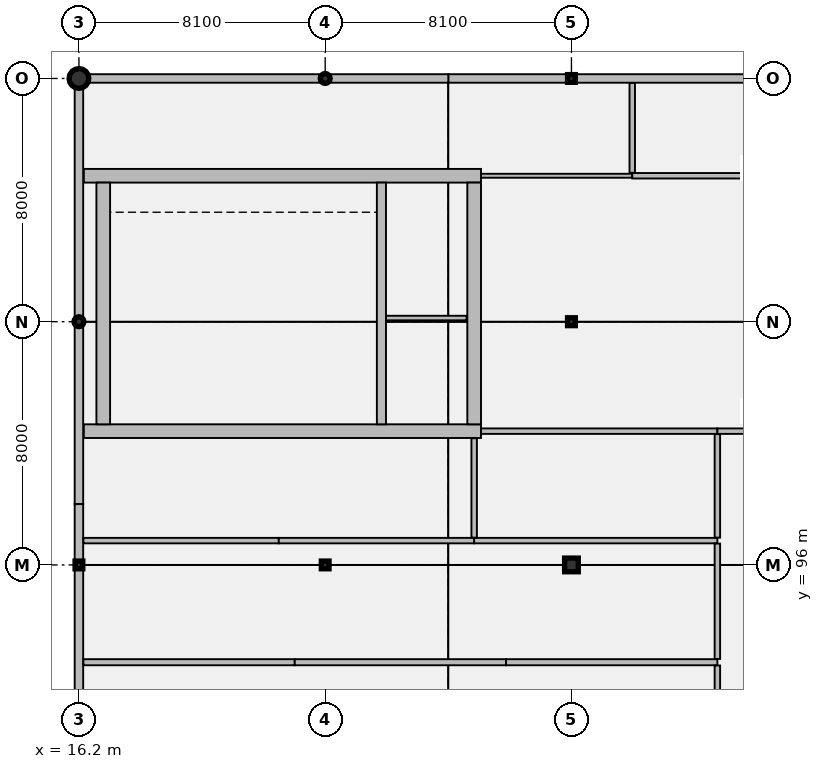
"""IFC4 building model, lengths in metres.
Left out: names, types, materials, properties, quantities, classifications, styles, units other than length and angle.
Written with IfcOpenShell. Run it as: python <this file> out.ifc"""

import sys

from ifc_helpers import new_model, si_unit, direction, frame, frame_2d, origin, origin_2d, place, context, subcontext, project, spatial, rectangle, hollow_rectangle, circle, hollow_circle, i_section, extrude, element, fill, save


model = new_model("IFC4")
c1 = context("Model", 3, precision=1e-05, world=origin(), true_north=direction((0.0, 1.0)))
c2 = subcontext(c1, "Body", "Model", "MODEL_VIEW")
j1 = project(units=[si_unit("LENGTHUNIT", "METRE"), si_unit("PLANEANGLEUNIT", "RADIAN")], contexts=[c1])
p1 = place(None, origin())
s1 = spatial("IfcSite", under=j1, at=p1, CompositionType="ELEMENT")
p2 = place(p1, origin())
s2 = spatial("IfcBuilding", under=s1, at=p2, CompositionType="ELEMENT")
p3 = place(p2, frame((0.0, 0.0, 33.3)))
s3 = spatial("IfcBuildingStorey", under=s2, at=p3, CompositionType="ELEMENT", Elevation=33.3)
p4 = place(p3, frame((16.36, 100.4, 0.0), z_axis=(0.0, 0.0, 1.0), x_axis=(1.0, 0.0, 0.0)))
e1 = element("IfcWall", 1, at=p4, inside=s3, PredefinedType="SHEAR", context=c2, shape_type="SweptSolid", body=[
    extrude(rectangle(XDim=13.065, YDim=0.45, at=frame_2d((6.532, 0.0))), origin(), (0.0, 0.0, 1.0), 3.98),
])
p5 = place(p4, frame((1.39, 0.0, 0.0)))
e2 = element("IfcOpeningElement", 2, at=p5, cuts=e1, PredefinedType="OPENING", context=c2, shape_type="SweptSolid", body=[
    extrude(rectangle(XDim=1.15, YDim=2.25, at=frame_2d((0.575, 1.125))), frame((0.0, 0.235, 0.0), z_axis=(0.0, -1.0, 0.0), x_axis=(1.0, 0.0, 0.0)), (0.0, 0.0, 1.0), 0.47),
])
p6 = place(p4, frame((10.695, 0.0, 0.0)))
e3 = element("IfcOpeningElement", 3, at=p6, cuts=e1, PredefinedType="OPENING", context=c2, shape_type="SweptSolid", body=[
    extrude(rectangle(XDim=1.1, YDim=2.2, at=frame_2d((0.55, 1.1))), frame((0.0, 0.235, 0.0), z_axis=(0.0, -1.0, 0.0), x_axis=(1.0, 0.0, 0.0)), (0.0, 0.0, 1.0), 0.47),
])
p7 = place(p3, frame((16.36, 108.8, 0.0), z_axis=(0.0, 0.0, 1.0), x_axis=(1.0, 0.0, 0.0)))
e4 = element("IfcWall", 4, at=p7, inside=s3, PredefinedType="SHEAR", context=c2, shape_type="SweptSolid", body=[
    extrude(rectangle(XDim=13.065, YDim=0.45, at=frame_2d((6.532, 0.0))), origin(), (0.0, 0.0, 1.0), 3.98),
])
for number, where, z_axis, x_axis in (
    (5, (17.0, 100.625, 0.0), (0.0, 0.0, 1.0), (0.0, 1.0, 0.0)),
    (6, (29.2, 100.625, 0.0), (0.0, 0.0, 1.0), (0.0, 1.0, 0.0)),
):
    element("IfcWall", number, at=place(p3, frame(where, z_axis=z_axis, x_axis=x_axis)), inside=s3, PredefinedType="SHEAR", context=c2, shape_type="SweptSolid", body=[
        extrude(rectangle(XDim=7.95, YDim=0.45, at=frame_2d((3.975, 0.0))), origin(), (0.0, 0.0, 1.0), 3.98),
    ])
p8 = place(p3, frame((26.15, 100.625, 0.0), z_axis=(0.0, 0.0, 1.0), x_axis=(0.0, 1.0, 0.0)))
e7 = element("IfcWall", 7, at=p8, inside=s3, PredefinedType="SHEAR", context=c2, shape_type="SweptSolid", body=[
    extrude(rectangle(XDim=7.95, YDim=0.3, at=frame_2d((3.975, 0.0))), origin(), (0.0, 0.0, 1.0), 3.98),
])
p9 = place(p3, frame((16.2, 96.0, 0.0), z_axis=(0.0, 0.0, 1.0), x_axis=(1.0, 0.0, 0.0)))
e8 = element("IfcColumn", 8, at=p9, inside=s3, PredefinedType="COLUMN", context=c2, shape_type="SweptSolid", body=[
    extrude(hollow_rectangle(XDim=0.254, YDim=0.254, WallThickness=0.013, InnerFilletRadius=0.013, OuterFilletRadius=0.025, at=origin_2d()), origin(), (0.0, 0.0, 1.0), 3.98),
])
p10 = place(p3, frame((16.2, 104.0, 0.0), z_axis=(0.0, 0.0, 1.0), x_axis=(1.0, 0.0, 0.0)))
e9 = element("IfcColumn", 9, at=p10, inside=s3, PredefinedType="COLUMN", context=c2, shape_type="SweptSolid", body=[
    extrude(hollow_circle(Radius=0.162, WallThickness=0.013, at=origin_2d()), origin(), (0.0, 0.0, 1.0), 3.98),
])
p11 = place(p3, frame((16.2, 112.0, 0.0), z_axis=(0.0, 0.0, 1.0), x_axis=(1.0, 0.0, 0.0)))
e10 = element("IfcColumn", 10, at=p11, inside=s3, PredefinedType="COLUMN", context=c2, shape_type="SweptSolid", body=[
    extrude(circle(Radius=0.325, at=origin_2d()), origin(), (0.0, 0.0, 1.0), 3.98),
])
p12 = place(p3, frame((24.3, 96.0, 0.0), z_axis=(0.0, 0.0, 1.0), x_axis=(1.0, 0.0, 0.0)))
e11 = element("IfcColumn", 11, at=p12, inside=s3, PredefinedType="COLUMN", context=c2, shape_type="SweptSolid", body=[
    extrude(hollow_rectangle(XDim=0.254, YDim=0.254, WallThickness=0.013, InnerFilletRadius=0.013, OuterFilletRadius=0.025, at=origin_2d()), origin(), (0.0, 0.0, 1.0), 3.98),
])
p13 = place(p3, frame((24.3, 112.0, 0.0), z_axis=(0.0, 0.0, 1.0), x_axis=(1.0, 0.0, 0.0)))
e12 = element("IfcColumn", 12, at=p13, inside=s3, PredefinedType="COLUMN", context=c2, shape_type="SweptSolid", body=[
    extrude(hollow_circle(Radius=0.162, WallThickness=0.013, at=origin_2d()), origin(), (0.0, 0.0, 1.0), 3.98),
])
p14 = place(p3, frame((32.4, 96.0, 0.0), z_axis=(0.0, 0.0, 1.0), x_axis=(1.0, 0.0, 0.0)))
e13 = element("IfcColumn", 13, at=p14, inside=s3, PredefinedType="COLUMN", context=c2, shape_type="SweptSolid", body=[
    extrude(rectangle(XDim=0.45, YDim=0.45, at=origin_2d()), origin(), (0.0, 0.0, 1.0), 3.98),
])
p15 = place(p3, frame((32.4, 104.0, 0.0), z_axis=(0.0, 0.0, 1.0), x_axis=(1.0, 0.0, 0.0)))
e14 = element("IfcColumn", 14, at=p15, inside=s3, PredefinedType="COLUMN", context=c2, shape_type="SweptSolid", body=[
    extrude(i_section(OverallWidth=0.256, OverallDepth=0.26, WebThickness=0.011, FlangeThickness=0.017, FilletRadius=0.013, at=origin_2d()), origin(), (0.0, 0.0, 1.0), 3.98),
])
p16 = place(p3, frame((32.4, 112.0, 0.0), z_axis=(0.0, 0.0, 1.0), x_axis=(1.0, 0.0, 0.0)))
e15 = element("IfcColumn", 15, at=p16, inside=s3, PredefinedType="COLUMN", context=c2, shape_type="SweptSolid", body=[
    extrude(hollow_rectangle(XDim=0.254, YDim=0.254, WallThickness=0.013, InnerFilletRadius=0.013, OuterFilletRadius=0.025, at=origin_2d()), origin(), (0.0, 0.0, 1.0), 3.98),
])
p17 = place(p3, frame((40.5, 112.0, 0.0), z_axis=(0.0, 0.0, 1.0), x_axis=(-1.0, 0.0, 0.0)))
e16 = element("IfcWall", 16, at=p17, inside=s3, PredefinedType="SOLIDWALL", context=c2, shape_type="SweptSolid", body=[
    extrude(rectangle(XDim=12.15, YDim=0.28, at=frame_2d((6.075, 0.0))), origin(), (0.0, 0.0, 1.0), 3.655),
])
p18 = place(p17, frame((3.6, 0.0, 0.85)))
e17 = element("IfcOpeningElement", 17, at=p18, cuts=e16, PredefinedType="OPENING", context=c2, shape_type="SweptSolid", body=[
    extrude(rectangle(XDim=1.35, YDim=2.1, at=frame_2d((0.675, 1.05))), frame((0.0, 0.15, 0.0), z_axis=(0.0, -1.0, 0.0), x_axis=(1.0, 0.0, 0.0)), (0.0, 0.0, 1.0), 0.3),
])
p19 = place(p3, frame((28.35, 112.0, 0.0), z_axis=(0.0, 0.0, 1.0), x_axis=(-1.0, 0.0, 0.0)))
e18 = element("IfcWall", 18, at=p19, inside=s3, PredefinedType="SOLIDWALL", context=c2, shape_type="SweptSolid", body=[
    extrude(rectangle(XDim=12.15, YDim=0.28, at=frame_2d((6.075, 0.0))), origin(), (0.0, 0.0, 1.0), 3.655),
])
p20 = place(p19, frame((5.4, 0.0, 0.95)))
e19 = element("IfcOpeningElement", 19, at=p20, cuts=e18, PredefinedType="OPENING", context=c2, shape_type="SweptSolid", body=[
    extrude(rectangle(XDim=1.5, YDim=1.8, at=frame_2d((0.75, 0.9))), frame((0.0, 0.15, 0.0), z_axis=(0.0, -1.0, 0.0), x_axis=(1.0, 0.0, 0.0)), (0.0, 0.0, 1.0), 0.3),
])
p21 = place(p3, frame((16.2, 112.0, 0.0), z_axis=(0.0, 0.0, 1.0), x_axis=(0.0, -1.0, 0.0)))
e20 = element("IfcWall", 20, at=p21, inside=s3, PredefinedType="SOLIDWALL", context=c2, shape_type="SweptSolid", body=[
    extrude(rectangle(XDim=14.0, YDim=0.28, at=frame_2d((7.0, 0.0))), origin(), (0.0, 0.0, 1.0), 3.655),
])
p22 = place(p3, frame((16.2, 98.0, 0.0), z_axis=(0.0, 0.0, 1.0), x_axis=(0.0, -1.0, 0.0)))
e21 = element("IfcWall", 21, at=p22, inside=s3, PredefinedType="SOLIDWALL", context=c2, shape_type="SweptSolid", body=[
    extrude(rectangle(XDim=14.0, YDim=0.28, at=frame_2d((7.0, 0.0))), origin(), (0.0, 0.0, 1.0), 3.655),
])
p23 = place(p22, frame((6.3, 0.0, 0.95)))
e22 = element("IfcOpeningElement", 22, at=p23, cuts=e21, PredefinedType="OPENING", context=c2, shape_type="SweptSolid", body=[
    extrude(rectangle(XDim=1.8, YDim=1.5, at=frame_2d((0.9, 0.75))), frame((0.0, 0.15, 0.0), z_axis=(0.0, -1.0, 0.0), x_axis=(1.0, 0.0, 0.0)), (0.0, 0.0, 1.0), 0.3),
])
p24 = place(p3, frame((26.3, 104.12, 0.0), z_axis=(0.0, 0.0, 1.0), x_axis=(1.0, 0.0, 0.0)))
e23 = element("IfcWall", 23, at=p24, inside=s3, PredefinedType="PARTITIONING", context=c2, shape_type="SweptSolid", body=[
    extrude(rectangle(XDim=2.65, YDim=0.15, at=frame_2d((1.325, 0.0))), origin(), (0.0, 0.0, 1.0), 3.98),
])
for number, where, z_axis, x_axis in (
    (24, (16.348, 92.8, 0.0), (0.0, 0.0, 1.0), (1.0, 0.0, 0.0)),
    (25, (23.299, 92.8, 0.0), (0.0, 0.0, 1.0), (1.0, 0.0, 0.0)),
    (26, (30.249, 92.8, 0.0), (0.0, 0.0, 1.0), (1.0, 0.0, 0.0)),
):
    element("IfcWall", number, at=place(p3, frame(where, z_axis=z_axis, x_axis=x_axis)), inside=s3, PredefinedType="PARTITIONING", context=c2, shape_type="SweptSolid", body=[
        extrude(rectangle(XDim=6.951, YDim=0.2, at=frame_2d((3.475, 0.0))), origin(), (0.0, 0.0, 1.0), 3.98),
    ])
for number, where, z_axis, x_axis in (
    (27, (16.348, 96.8, 0.0), (0.0, 0.0, 1.0), (1.0, 0.0, 0.0)),
    (28, (22.774, 96.8, 0.0), (0.0, 0.0, 1.0), (1.0, 0.0, 0.0)),
):
    element("IfcWall", number, at=place(p3, frame(where, z_axis=z_axis, x_axis=x_axis)), inside=s3, PredefinedType="PARTITIONING", context=c2, shape_type="SweptSolid", body=[
        extrude(rectangle(XDim=6.426, YDim=0.18, at=frame_2d((3.213, 0.0))), origin(), (0.0, 0.0, 1.0), 3.98),
    ])
p25 = place(p3, frame((29.2, 96.8, 0.0), z_axis=(0.0, 0.0, 1.0), x_axis=(1.0, 0.0, 0.0)))
e29 = element("IfcWall", 29, at=p25, inside=s3, PredefinedType="PARTITIONING", context=c2, shape_type="SweptSolid", body=[
    extrude(rectangle(XDim=8.0, YDim=0.18, at=frame_2d((4.0, 0.0))), origin(), (0.0, 0.0, 1.0), 3.98),
])
p26 = place(p3, frame((29.425, 100.4, 0.0), z_axis=(0.0, 0.0, 1.0), x_axis=(1.0, 0.0, 0.0)))
e30 = element("IfcWall", 30, at=p26, inside=s3, PredefinedType="PARTITIONING", context=c2, shape_type="SweptSolid", body=[
    extrude(rectangle(XDim=7.775, YDim=0.18, at=frame_2d((3.887, 0.0))), origin(), (0.0, 0.0, 1.0), 3.98),
])
p27 = place(p26, frame((3.387, 0.0, 0.0)))
e31 = element("IfcOpeningElement", 31, at=p27, cuts=e30, PredefinedType="OPENING", context=c2, shape_type="SweptSolid", body=[
    extrude(rectangle(XDim=1.0, YDim=2.2, at=frame_2d((0.5, 1.1))), frame((0.0, 0.1, 0.0), z_axis=(0.0, -1.0, 0.0), x_axis=(1.0, 0.0, 0.0)), (0.0, 0.0, 1.0), 0.2),
])
p28 = place(p3, frame((29.425, 108.8, 0.0), z_axis=(0.0, 0.0, 1.0), x_axis=(1.0, 0.0, 0.0)))
e32 = element("IfcWall", 32, at=p28, inside=s3, PredefinedType="PARTITIONING", context=c2, shape_type="SweptSolid", body=[
    extrude(rectangle(XDim=4.975, YDim=0.13, at=frame_2d((2.487, 0.0))), origin(), (0.0, 0.0, 1.0), 3.98),
])
p29 = place(p28, frame((1.988, 0.0, 0.0)))
e33 = element("IfcOpeningElement", 33, at=p29, cuts=e32, PredefinedType="OPENING", context=c2, shape_type="SweptSolid", body=[
    extrude(rectangle(XDim=1.0, YDim=2.2, at=frame_2d((0.5, 1.1))), frame((0.0, 0.075, 0.0), z_axis=(0.0, -1.0, 0.0), x_axis=(1.0, 0.0, 0.0)), (0.0, 0.0, 1.0), 0.15),
])
p30 = place(p3, frame((34.4, 108.8, 0.0), z_axis=(0.0, 0.0, 1.0), x_axis=(1.0, 0.0, 0.0)))
e34 = element("IfcWall", 34, at=p30, inside=s3, PredefinedType="PARTITIONING", context=c2, shape_type="SweptSolid", body=[
    extrude(rectangle(XDim=5.2, YDim=0.18, at=frame_2d((2.6, 0.0))), origin(), (0.0, 0.0, 1.0), 3.98),
])
p31 = place(p30, frame((2.1, 0.0, 0.0)))
e35 = element("IfcOpeningElement", 35, at=p31, cuts=e34, PredefinedType="OPENING", context=c2, shape_type="SweptSolid", body=[
    extrude(rectangle(XDim=1.0, YDim=2.15, at=frame_2d((0.5, 1.075))), frame((0.0, 0.1, 0.0), z_axis=(0.0, -1.0, 0.0), x_axis=(1.0, 0.0, 0.0)), (0.0, 0.0, 1.0), 0.2),
])
p32 = place(p3, frame((37.2, 100.4, 0.0), z_axis=(0.0, 0.0, 1.0), x_axis=(1.0, 0.0, 0.0)))
e36 = element("IfcWall", 36, at=p32, inside=s3, PredefinedType="PARTITIONING", context=c2, shape_type="SweptSolid", body=[
    extrude(rectangle(XDim=2.4, YDim=0.18, at=frame_2d((1.2, 0.0))), origin(), (0.0, 0.0, 1.0), 3.98),
])
p33 = place(p3, frame((29.2, 96.898, 0.0), z_axis=(0.0, 0.0, 1.0), x_axis=(0.0, 1.0, 0.0)))
e37 = element("IfcWall", 37, at=p33, inside=s3, PredefinedType="PARTITIONING", context=c2, shape_type="SweptSolid", body=[
    extrude(rectangle(XDim=3.269, YDim=0.18, at=frame_2d((1.635, 0.0))), origin(), (0.0, 0.0, 1.0), 3.98),
])
p34 = place(p33, frame((1.034, 0.0, 0.0)))
e38 = element("IfcOpeningElement", 38, at=p34, cuts=e37, PredefinedType="OPENING", context=c2, shape_type="SweptSolid", body=[
    extrude(rectangle(XDim=1.2, YDim=2.2, at=frame_2d((0.6, 1.1))), frame((0.0, 0.1, 0.0), z_axis=(0.0, -1.0, 0.0), x_axis=(1.0, 0.0, 0.0)), (0.0, 0.0, 1.0), 0.2),
])
p35 = place(p3, frame((34.4, 108.898, 0.0), z_axis=(0.0, 0.0, 1.0), x_axis=(0.0, 1.0, 0.0)))
e39 = element("IfcWall", 39, at=p35, inside=s3, PredefinedType="PARTITIONING", context=c2, shape_type="SweptSolid", body=[
    extrude(rectangle(XDim=2.954, YDim=0.18, at=frame_2d((1.477, 0.0))), origin(), (0.0, 0.0, 1.0), 3.98),
])
p36 = place(p3, frame((37.2, 88.308, 0.0), z_axis=(0.0, 0.0, 1.0), x_axis=(0.0, 1.0, 0.0)))
e40 = element("IfcWall", 40, at=p36, inside=s3, PredefinedType="PARTITIONING", context=c2, shape_type="SweptSolid", body=[
    extrude(rectangle(XDim=4.384, YDim=0.18, at=frame_2d((2.192, 0.0))), origin(), (0.0, 0.0, 1.0), 3.98),
])
p37 = place(p36, frame((1.642, 0.0, 0.0)))
e41 = element("IfcOpeningElement", 41, at=p37, cuts=e40, PredefinedType="OPENING", context=c2, shape_type="SweptSolid", body=[
    extrude(rectangle(XDim=1.1, YDim=2.2, at=frame_2d((0.55, 1.1))), frame((0.0, 0.1, 0.0), z_axis=(0.0, -1.0, 0.0), x_axis=(1.0, 0.0, 0.0)), (0.0, 0.0, 1.0), 0.2),
])
p38 = place(p3, frame((37.2, 92.908, 0.0), z_axis=(0.0, 0.0, 1.0), x_axis=(0.0, 1.0, 0.0)))
e42 = element("IfcWall", 42, at=p38, inside=s3, PredefinedType="PARTITIONING", context=c2, shape_type="SweptSolid", body=[
    extrude(rectangle(XDim=3.794, YDim=0.18, at=frame_2d((1.897, 0.0))), origin(), (0.0, 0.0, 1.0), 3.98),
])
p39 = place(p38, frame((1.397, 0.0, 0.0)))
e43 = element("IfcOpeningElement", 43, at=p39, cuts=e42, PredefinedType="OPENING", context=c2, shape_type="SweptSolid", body=[
    extrude(rectangle(XDim=1.0, YDim=2.2, at=frame_2d((0.5, 1.1))), frame((0.0, 0.1, 0.0), z_axis=(0.0, -1.0, 0.0), x_axis=(1.0, 0.0, 0.0)), (0.0, 0.0, 1.0), 0.2),
])
p40 = place(p3, frame((37.2, 96.898, 0.0), z_axis=(0.0, 0.0, 1.0), x_axis=(0.0, 1.0, 0.0)))
e44 = element("IfcWall", 44, at=p40, inside=s3, PredefinedType="PARTITIONING", context=c2, shape_type="SweptSolid", body=[
    extrude(rectangle(XDim=3.404, YDim=0.18, at=frame_2d((1.702, 0.0))), origin(), (0.0, 0.0, 1.0), 3.98),
])
p41 = place(p40, frame((1.152, 0.0, 0.0)))
e45 = element("IfcOpeningElement", 45, at=p41, cuts=e44, PredefinedType="OPENING", context=c2, shape_type="SweptSolid", body=[
    extrude(rectangle(XDim=1.1, YDim=2.2, at=frame_2d((0.55, 1.1))), frame((0.0, 0.1, 0.0), z_axis=(0.0, -1.0, 0.0), x_axis=(1.0, 0.0, 0.0)), (0.0, 0.0, 1.0), 0.2),
])
p42 = place(p18, origin())
e46 = element("IfcWindow", 46, at=p42, inside=s3, PartitioningType="DOUBLE_PANEL_VERTICAL", PredefinedType="WINDOW", context=c2, shape_type="SweptSolid", body=[
    extrude(rectangle(XDim=1.35, YDim=2.1, at=frame_2d((0.675, 1.05))), frame((0.0, 0.03, 0.0), z_axis=(0.0, -1.0, 0.0), x_axis=(1.0, 0.0, 0.0)), (0.0, 0.0, 1.0), 0.06),
])
fill(e17, e46)
p43 = place(p20, origin())
e47 = element("IfcWindow", 47, at=p43, inside=s3, PartitioningType="DOUBLE_PANEL_VERTICAL", PredefinedType="WINDOW", context=c2, shape_type="SweptSolid", body=[
    extrude(rectangle(XDim=1.5, YDim=1.8, at=frame_2d((0.75, 0.9))), frame((0.0, 0.03, 0.0), z_axis=(0.0, -1.0, 0.0), x_axis=(1.0, 0.0, 0.0)), (0.0, 0.0, 1.0), 0.06),
])
fill(e19, e47)
p44 = place(p5, origin())
e48 = element("IfcDoor", 48, at=p44, inside=s3, OperationType="SINGLE_SWING_LEFT", PredefinedType="DOOR", context=c2, shape_type="SweptSolid", body=[
    extrude(rectangle(XDim=1.15, YDim=2.25, at=frame_2d((0.575, 1.125))), frame((0.0, 0.025, 0.0), z_axis=(0.0, -1.0, 0.0), x_axis=(1.0, 0.0, 0.0)), (0.0, 0.0, 1.0), 0.05),
])
fill(e2, e48)
p45 = place(p6, frame((1.1, 0.0, 0.0), z_axis=(0.0, 0.0, 1.0), x_axis=(-1.0, 0.0, 0.0)))
e49 = element("IfcDoor", 49, at=p45, inside=s3, OperationType="DOUBLE_DOOR_SLIDING", PredefinedType="DOOR", context=c2, shape_type="SweptSolid", body=[
    extrude(rectangle(XDim=1.1, YDim=2.2, at=frame_2d((0.55, 1.1))), frame((0.0, 0.025, 0.0), z_axis=(0.0, -1.0, 0.0), x_axis=(1.0, 0.0, 0.0)), (0.0, 0.0, 1.0), 0.05),
])
fill(e3, e49)
p46 = place(p27, origin())
e50 = element("IfcDoor", 50, at=p46, inside=s3, OperationType="SINGLE_SWING_RIGHT", PredefinedType="DOOR", context=c2, shape_type="SweptSolid", body=[
    extrude(rectangle(XDim=1.0, YDim=2.2, at=frame_2d((0.5, 1.1))), frame((0.0, 0.025, 0.0), z_axis=(0.0, -1.0, 0.0), x_axis=(1.0, 0.0, 0.0)), (0.0, 0.0, 1.0), 0.05),
])
fill(e31, e50)
p47 = place(p29, origin())
e51 = element("IfcDoor", 51, at=p47, inside=s3, OperationType="SINGLE_SWING_LEFT", PredefinedType="DOOR", context=c2, shape_type="SweptSolid", body=[
    extrude(rectangle(XDim=1.0, YDim=2.2, at=frame_2d((0.5, 1.1))), frame((0.0, 0.025, 0.0), z_axis=(0.0, -1.0, 0.0), x_axis=(1.0, 0.0, 0.0)), (0.0, 0.0, 1.0), 0.05),
])
fill(e33, e51)
p48 = place(p31, origin())
e52 = element("IfcDoor", 52, at=p48, inside=s3, OperationType="SINGLE_SWING_RIGHT", PredefinedType="DOOR", context=c2, shape_type="SweptSolid", body=[
    extrude(rectangle(XDim=1.0, YDim=2.15, at=frame_2d((0.5, 1.075))), frame((0.0, 0.025, 0.0), z_axis=(0.0, -1.0, 0.0), x_axis=(1.0, 0.0, 0.0)), (0.0, 0.0, 1.0), 0.05),
])
fill(e35, e52)
p49 = place(p34, frame((1.2, 0.0, 0.0), z_axis=(0.0, 0.0, 1.0), x_axis=(-1.0, 0.0, 0.0)))
e53 = element("IfcDoor", 53, at=p49, inside=s3, OperationType="SINGLE_SWING_RIGHT", PredefinedType="DOOR", context=c2, shape_type="SweptSolid", body=[
    extrude(rectangle(XDim=1.2, YDim=2.2, at=frame_2d((0.6, 1.1))), frame((0.0, 0.025, 0.0), z_axis=(0.0, -1.0, 0.0), x_axis=(1.0, 0.0, 0.0)), (0.0, 0.0, 1.0), 0.05),
])
fill(e38, e53)
p50 = place(p39, origin())
e54 = element("IfcDoor", 54, at=p50, inside=s3, OperationType="SINGLE_SWING_LEFT", PredefinedType="DOOR", context=c2, shape_type="SweptSolid", body=[
    extrude(rectangle(XDim=1.0, YDim=2.2, at=frame_2d((0.5, 1.1))), frame((0.0, 0.025, 0.0), z_axis=(0.0, -1.0, 0.0), x_axis=(1.0, 0.0, 0.0)), (0.0, 0.0, 1.0), 0.05),
])
fill(e43, e54)
p51 = place(p41, origin())
e55 = element("IfcDoor", 55, at=p51, inside=s3, OperationType="SINGLE_SWING_RIGHT", PredefinedType="DOOR", context=c2, shape_type="SweptSolid", body=[
    extrude(rectangle(XDim=1.1, YDim=2.2, at=frame_2d((0.55, 1.1))), frame((0.0, 0.025, 0.0), z_axis=(0.0, -1.0, 0.0), x_axis=(1.0, 0.0, 0.0)), (0.0, 0.0, 1.0), 0.05),
])
fill(e45, e55)
save(model, sys.argv[1])
